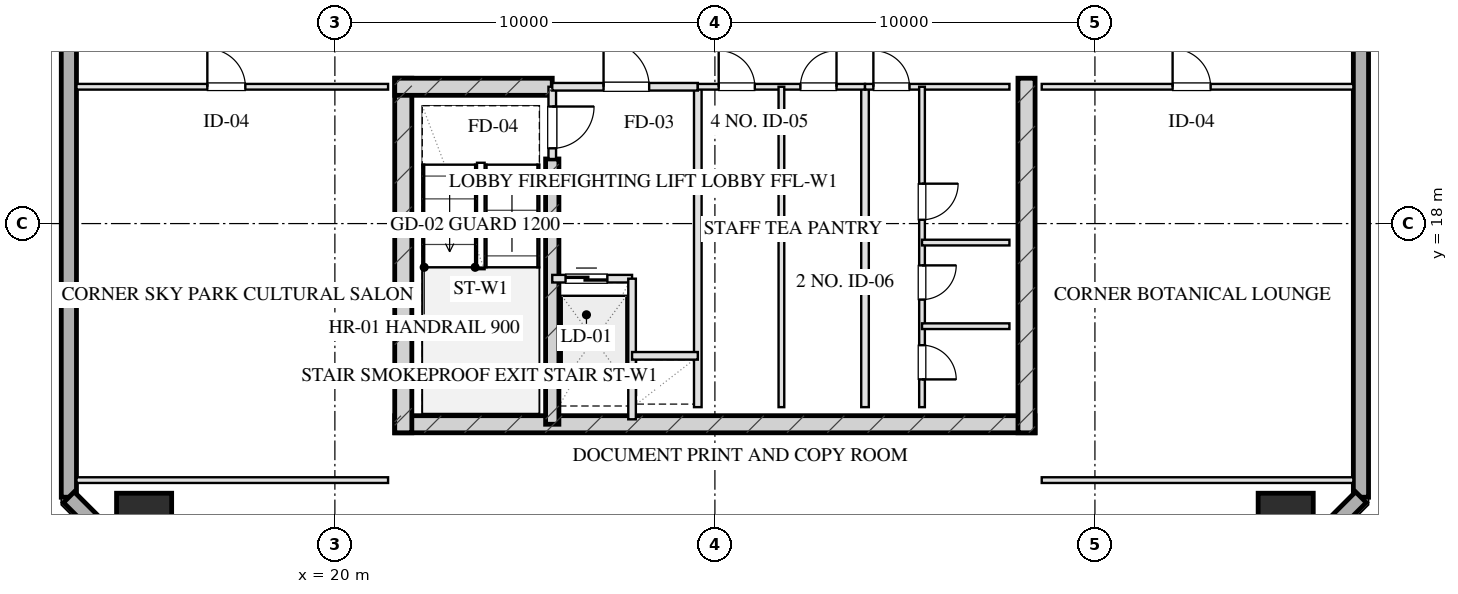
"""IFC4 building model, lengths in metres.
Left out: names, types, materials, properties, quantities, classifications, styles, units other than length and angle.
Written with IfcOpenShell. Run it as: python <this file> out.ifc"""

import sys

from ifc_helpers import new_model, si_unit, direction, frame, frame_2d, origin, origin_2d, place, context, subcontext, project, spatial, rectangle, hollow_rectangle, extrude, element, fill, save


model = new_model("IFC4")
c1 = context("Model", 3, precision=1e-05, world=origin(), true_north=direction((0.0, 1.0)))
c2 = subcontext(c1, "Body", "Model", "MODEL_VIEW")
j1 = project(units=[si_unit("LENGTHUNIT", "METRE"), si_unit("PLANEANGLEUNIT", "RADIAN")], contexts=[c1])
p1 = place(None, origin())
s1 = spatial("IfcSite", under=j1, at=p1, CompositionType="ELEMENT")
p2 = place(p1, origin())
s2 = spatial("IfcBuilding", under=s1, at=p2, CompositionType="ELEMENT")
p3 = place(p2, frame((0.0, 0.0, 219.65)))
s3 = spatial("IfcBuildingStorey", under=s2, at=p3, CompositionType="ELEMENT", Elevation=219.65)
p4 = place(p3, frame((21.575, 12.72, 0.0), z_axis=(0.0, 0.0, 1.0), x_axis=(1.0, 0.0, 0.0)))
e1 = element("IfcWall", 1, at=p4, inside=s3, PredefinedType="SHEAR", context=c2, shape_type="SweptSolid", body=[
    extrude(rectangle(XDim=16.85, YDim=0.45, at=frame_2d((8.425, 0.0))), origin(), (0.0, 0.0, 1.0), 3.45),
])
for number, where, z_axis, x_axis in (
    (2, (21.8, 21.825, 0.0), (0.0, 0.0, 1.0), (0.0, -1.0, 0.0)),
    (3, (38.2, 21.825, 0.0), (0.0, 0.0, 1.0), (0.0, -1.0, 0.0)),
):
    element("IfcWall", number, at=place(p3, frame(where, z_axis=z_axis, x_axis=x_axis)), inside=s3, PredefinedType="SHEAR", context=c2, shape_type="SweptSolid", body=[
        extrude(rectangle(XDim=9.33, YDim=0.45, at=frame_2d((4.665, 0.0))), origin(), (0.0, 0.0, 1.0), 3.45),
    ])
p5 = place(p3, frame((25.72, 19.7, 0.0), z_axis=(0.0, 0.0, 1.0), x_axis=(0.0, -1.0, 0.0)))
e4 = element("IfcWall", 4, at=p5, inside=s3, PredefinedType="SHEAR", context=c2, shape_type="SweptSolid", body=[
    extrude(rectangle(XDim=6.98, YDim=0.35, at=frame_2d((3.49, 0.0))), origin(), (0.0, 0.0, 1.0), 3.45),
])
p6 = place(p3, frame((21.575, 21.6, 0.0), z_axis=(0.0, 0.0, 1.0), x_axis=(1.0, 0.0, 0.0)))
e5 = element("IfcWall", 5, at=p6, inside=s3, PredefinedType="SHEAR", context=c2, shape_type="SweptSolid", body=[
    extrude(rectangle(XDim=4.145, YDim=0.45, at=frame_2d((2.073, 0.0))), origin(), (0.0, 0.0, 1.0), 3.45),
])
for number, where, z_axis, x_axis in (
    (6, (14.98, 10.18, 0.0), (0.0, 0.0, 1.0), (1.0, 0.0, 0.0)),
    (7, (45.02, 10.18, 0.0), (0.0, 0.0, 1.0), (1.0, 0.0, 0.0)),
):
    element("IfcColumn", number, at=place(p3, frame(where, z_axis=z_axis, x_axis=x_axis)), inside=s3, PredefinedType="COLUMN", context=c2, shape_type="SweptSolid", body=[
        extrude(hollow_rectangle(XDim=1.45, YDim=1.45, WallThickness=0.05, at=origin_2d()), origin(), (0.0, 0.0, 1.0), 3.451),
    ])
p7 = place(p3, frame((13.0, 10.8, 0.0), z_axis=(0.0, 0.0, 1.0), x_axis=(0.0, 1.0, 0.0)))
e8 = element("IfcWall", 8, at=p7, inside=s3, PredefinedType="SOLIDWALL", context=c2, shape_type="SweptSolid", body=[
    extrude(rectangle(XDim=46.4, YDim=0.4, at=frame_2d((23.2, 0.0))), origin(), (0.0, 0.0, 1.0), 2.61),
])
p8 = place(p7, frame((15.75, 0.0, 0.75)))
e9 = element("IfcOpeningElement", 9, at=p8, cuts=e8, PredefinedType="OPENING", context=c2, shape_type="SweptSolid", body=[
    extrude(rectangle(XDim=2.1, YDim=1.46, at=frame_2d((1.05, 0.73))), frame((0.0, 0.21, 0.0), z_axis=(0.0, -1.0, 0.0), x_axis=(1.0, 0.0, 0.0)), (0.0, 0.0, 1.0), 0.42),
])
p9 = place(p7, frame((19.55, 0.0, 0.75)))
e10 = element("IfcOpeningElement", 10, at=p9, cuts=e8, PredefinedType="OPENING", context=c2, shape_type="SweptSolid", body=[
    extrude(rectangle(XDim=2.1, YDim=1.46, at=frame_2d((1.05, 0.73))), frame((0.0, 0.21, 0.0), z_axis=(0.0, -1.0, 0.0), x_axis=(1.0, 0.0, 0.0)), (0.0, 0.0, 1.0), 0.42),
])
p10 = place(p7, frame((24.75, 0.0, 0.75)))
e11 = element("IfcOpeningElement", 11, at=p10, cuts=e8, PredefinedType="OPENING", context=c2, shape_type="SweptSolid", body=[
    extrude(rectangle(XDim=2.1, YDim=1.46, at=frame_2d((1.05, 0.73))), frame((0.0, 0.21, 0.0), z_axis=(0.0, -1.0, 0.0), x_axis=(1.0, 0.0, 0.0)), (0.0, 0.0, 1.0), 0.42),
])
p11 = place(p7, frame((28.55, 0.0, 0.75)))
e12 = element("IfcOpeningElement", 12, at=p11, cuts=e8, PredefinedType="OPENING", context=c2, shape_type="SweptSolid", body=[
    extrude(rectangle(XDim=2.1, YDim=1.46, at=frame_2d((1.05, 0.73))), frame((0.0, 0.21, 0.0), z_axis=(0.0, -1.0, 0.0), x_axis=(1.0, 0.0, 0.0)), (0.0, 0.0, 1.0), 0.42),
])
p12 = place(p3, frame((47.0, 57.2, 0.0), z_axis=(0.0, 0.0, 1.0), x_axis=(0.0, -1.0, 0.0)))
e13 = element("IfcWall", 13, at=p12, inside=s3, PredefinedType="SOLIDWALL", context=c2, shape_type="SweptSolid", body=[
    extrude(rectangle(XDim=46.4, YDim=0.4, at=frame_2d((23.2, 0.0))), origin(), (0.0, 0.0, 1.0), 2.61),
])
p13 = place(p12, frame((20.85, 0.0, 0.0)))
e14 = element("IfcOpeningElement", 14, at=p13, cuts=e13, PredefinedType="OPENING", context=c2, shape_type="SweptSolid", body=[
    extrude(rectangle(XDim=1.8, YDim=2.2, at=frame_2d((0.9, 1.1))), frame((0.0, 0.21, 0.0), z_axis=(0.0, -1.0, 0.0), x_axis=(1.0, 0.0, 0.0)), (0.0, 0.0, 1.0), 0.42),
])
for number, where, z_axis, x_axis in (
    (15, (47.0, 10.8, 0.0), (0.0, 0.0, 1.0), (-0.707, -0.707, 0.0)),
    (16, (15.6, 8.2, 0.0), (0.0, 0.0, 1.0), (-0.707, 0.707, 0.0)),
):
    element("IfcWall", number, at=place(p3, frame(where, z_axis=z_axis, x_axis=x_axis)), inside=s3, PredefinedType="SOLIDWALL", context=c2, shape_type="SweptSolid", body=[
        extrude(rectangle(XDim=3.677, YDim=0.4, at=frame_2d((1.838, 0.0))), origin(), (0.0, 0.0, 1.0), 2.61),
    ])
p14 = place(p3, frame((25.72, 21.6, 0.0), z_axis=(0.0, 0.0, 1.0), x_axis=(0.0, -1.0, 0.0)))
e17 = element("IfcWall", 17, at=p14, inside=s3, PredefinedType="PARTITIONING", context=c2, shape_type="SweptSolid", body=[
    extrude(rectangle(XDim=1.9, YDim=0.2, at=frame_2d((0.95, 0.0))), origin(), (0.0, 0.0, 1.0), 3.175),
])
p15 = place(p14, frame((0.52, 0.0, 0.0)))
e18 = element("IfcOpeningElement", 18, at=p15, cuts=e17, PredefinedType="OPENING", context=c2, shape_type="SweptSolid", body=[
    extrude(rectangle(XDim=1.1, YDim=2.05, at=frame_2d((0.55, 1.025))), frame((0.0, 0.11, 0.0), z_axis=(0.0, -1.0, 0.0), x_axis=(1.0, 0.0, 0.0)), (0.0, 0.0, 1.0), 0.22),
])
p16 = place(p3, frame((29.55, 21.6, 0.0), z_axis=(0.0, 0.0, 1.0), x_axis=(0.0, -1.0, 0.0)))
e19 = element("IfcWall", 19, at=p16, inside=s3, PredefinedType="PARTITIONING", context=c2, shape_type="SweptSolid", body=[
    extrude(rectangle(XDim=8.43, YDim=0.2, at=frame_2d((4.215, 0.0))), origin(), (0.0, 0.0, 1.0), 3.175),
])
p17 = place(p3, frame((25.72, 21.6, 0.0), z_axis=(0.0, 0.0, 1.0), x_axis=(1.0, 0.0, 0.0)))
e20 = element("IfcWall", 20, at=p17, inside=s3, PredefinedType="PARTITIONING", context=c2, shape_type="SweptSolid", body=[
    extrude(rectangle(XDim=3.83, YDim=0.2, at=frame_2d((1.915, 0.0))), origin(), (0.0, 0.0, 1.0), 3.175),
])
p18 = place(p17, frame((1.35, 0.0, 0.0)))
e21 = element("IfcOpeningElement", 21, at=p18, cuts=e20, PredefinedType="OPENING", context=c2, shape_type="SweptSolid", body=[
    extrude(rectangle(XDim=1.2, YDim=2.05, at=frame_2d((0.6, 1.025))), frame((0.0, 0.11, 0.0), z_axis=(0.0, -1.0, 0.0), x_axis=(1.0, 0.0, 0.0)), (0.0, 0.0, 1.0), 0.22),
])
p19 = place(p3, frame((25.72, 16.55, 0.0), z_axis=(0.0, 0.0, 1.0), x_axis=(1.0, 0.0, 0.0)))
e22 = element("IfcWall", 22, at=p19, inside=s3, PredefinedType="PARTITIONING", context=c2, shape_type="SweptSolid", body=[
    extrude(rectangle(XDim=2.1, YDim=0.2, at=frame_2d((1.05, 0.0))), origin(), (0.0, 0.0, 1.0), 3.175),
])
p20 = place(p19, frame((0.35, 0.0, 0.0)))
e23 = element("IfcOpeningElement", 23, at=p20, cuts=e22, PredefinedType="OPENING", context=c2, shape_type="SweptSolid", body=[
    extrude(rectangle(XDim=1.1, YDim=2.05, at=frame_2d((0.55, 1.025))), frame((0.0, 0.11, 0.0), z_axis=(0.0, -1.0, 0.0), x_axis=(1.0, 0.0, 0.0)), (0.0, 0.0, 1.0), 0.22),
])
p21 = place(p3, frame((27.82, 16.55, 0.0), z_axis=(0.0, 0.0, 1.0), x_axis=(0.0, -1.0, 0.0)))
e24 = element("IfcWall", 24, at=p21, inside=s3, PredefinedType="PARTITIONING", context=c2, shape_type="SweptSolid", body=[
    extrude(rectangle(XDim=3.7, YDim=0.2, at=frame_2d((1.85, 0.0))), origin(), (0.0, 0.0, 1.0), 3.175),
])
p22 = place(p3, frame((27.82, 14.52, 0.0), z_axis=(0.0, 0.0, 1.0), x_axis=(1.0, 0.0, 0.0)))
e25 = element("IfcWall", 25, at=p22, inside=s3, PredefinedType="PARTITIONING", context=c2, shape_type="SweptSolid", body=[
    extrude(rectangle(XDim=1.73, YDim=0.2, at=frame_2d((0.865, 0.0))), origin(), (0.0, 0.0, 1.0), 3.175),
])
p23 = place(p3, frame((33.95, 21.6, 0.0), z_axis=(0.0, 0.0, 1.0), x_axis=(0.0, -1.0, 0.0)))
e26 = element("IfcWall", 26, at=p23, inside=s3, PredefinedType="PARTITIONING", context=c2, shape_type="SweptSolid", body=[
    extrude(rectangle(XDim=8.43, YDim=0.2, at=frame_2d((4.215, 0.0))), origin(), (0.0, 0.0, 1.0), 3.175),
])
p24 = place(p3, frame((29.55, 21.6, 0.0), z_axis=(0.0, 0.0, 1.0), x_axis=(1.0, 0.0, 0.0)))
e27 = element("IfcWall", 27, at=p24, inside=s3, PredefinedType="PARTITIONING", context=c2, shape_type="SweptSolid", body=[
    extrude(rectangle(XDim=4.4, YDim=0.15, at=frame_2d((2.2, 0.0))), origin(), (0.0, 0.0, 1.0), 3.175),
])
p25 = place(p24, frame((0.55, 0.0, 0.0)))
e28 = element("IfcOpeningElement", 28, at=p25, cuts=e27, PredefinedType="OPENING", context=c2, shape_type="SweptSolid", body=[
    extrude(rectangle(XDim=0.95, YDim=2.05, at=frame_2d((0.475, 1.025))), frame((0.0, 0.085, 0.0), z_axis=(0.0, -1.0, 0.0), x_axis=(1.0, 0.0, 0.0)), (0.0, 0.0, 1.0), 0.17),
])
p26 = place(p24, frame((2.7, 0.0, 0.0)))
e29 = element("IfcOpeningElement", 29, at=p26, cuts=e27, PredefinedType="OPENING", context=c2, shape_type="SweptSolid", body=[
    extrude(rectangle(XDim=0.95, YDim=2.05, at=frame_2d((0.475, 1.025))), frame((0.0, 0.085, 0.0), z_axis=(0.0, -1.0, 0.0), x_axis=(1.0, 0.0, 0.0)), (0.0, 0.0, 1.0), 0.17),
])
p27 = place(p3, frame((31.75, 21.6, 0.0), z_axis=(0.0, 0.0, 1.0), x_axis=(0.0, -1.0, 0.0)))
e30 = element("IfcWall", 30, at=p27, inside=s3, PredefinedType="PARTITIONING", context=c2, shape_type="SweptSolid", body=[
    extrude(rectangle(XDim=8.43, YDim=0.15, at=frame_2d((4.215, 0.0))), origin(), (0.0, 0.0, 1.0), 3.175),
])
p28 = place(p3, frame((33.95, 21.6, 0.0), z_axis=(0.0, 0.0, 1.0), x_axis=(1.0, 0.0, 0.0)))
e31 = element("IfcWall", 31, at=p28, inside=s3, PredefinedType="PARTITIONING", context=c2, shape_type="SweptSolid", body=[
    extrude(rectangle(XDim=3.8, YDim=0.15, at=frame_2d((1.9, 0.0))), origin(), (0.0, 0.0, 1.0), 3.175),
])
p29 = place(p28, frame((0.22, 0.0, 0.0)))
e32 = element("IfcOpeningElement", 32, at=p29, cuts=e31, PredefinedType="OPENING", context=c2, shape_type="SweptSolid", body=[
    extrude(rectangle(XDim=0.95, YDim=2.05, at=frame_2d((0.475, 1.025))), frame((0.0, 0.085, 0.0), z_axis=(0.0, -1.0, 0.0), x_axis=(1.0, 0.0, 0.0)), (0.0, 0.0, 1.0), 0.17),
])
p30 = place(p3, frame((35.45, 21.6, 0.0), z_axis=(0.0, 0.0, 1.0), x_axis=(0.0, -1.0, 0.0)))
e33 = element("IfcWall", 33, at=p30, inside=s3, PredefinedType="PARTITIONING", context=c2, shape_type="SweptSolid", body=[
    extrude(rectangle(XDim=8.43, YDim=0.15, at=frame_2d((4.215, 0.0))), origin(), (0.0, 0.0, 1.0), 2.815),
])
p31 = place(p30, frame((2.55, 0.0, 0.0)))
e34 = element("IfcOpeningElement", 34, at=p31, cuts=e33, PredefinedType="OPENING", context=c2, shape_type="SweptSolid", body=[
    extrude(rectangle(XDim=0.95, YDim=2.05, at=frame_2d((0.475, 1.025))), frame((0.0, 0.085, 0.0), z_axis=(0.0, -1.0, 0.0), x_axis=(1.0, 0.0, 0.0)), (0.0, 0.0, 1.0), 0.17),
])
p32 = place(p30, frame((4.7, 0.0, 0.0)))
e35 = element("IfcOpeningElement", 35, at=p32, cuts=e33, PredefinedType="OPENING", context=c2, shape_type="SweptSolid", body=[
    extrude(rectangle(XDim=0.9, YDim=2.05, at=frame_2d((0.45, 1.025))), frame((0.0, 0.085, 0.0), z_axis=(0.0, -1.0, 0.0), x_axis=(1.0, 0.0, 0.0)), (0.0, 0.0, 1.0), 0.17),
])
p33 = place(p30, frame((6.8, 0.0, 0.0)))
e36 = element("IfcOpeningElement", 36, at=p33, cuts=e33, PredefinedType="OPENING", context=c2, shape_type="SweptSolid", body=[
    extrude(rectangle(XDim=0.9, YDim=2.05, at=frame_2d((0.45, 1.025))), frame((0.0, 0.085, 0.0), z_axis=(0.0, -1.0, 0.0), x_axis=(1.0, 0.0, 0.0)), (0.0, 0.0, 1.0), 0.17),
])
for number, where, z_axis, x_axis in (
    (37, (35.45, 17.5, 0.0), (0.0, 0.0, 1.0), (1.0, 0.0, 0.0)),
    (38, (35.45, 15.3, 0.0), (0.0, 0.0, 1.0), (1.0, 0.0, 0.0)),
):
    element("IfcWall", number, at=place(p3, frame(where, z_axis=z_axis, x_axis=x_axis)), inside=s3, PredefinedType="PARTITIONING", context=c2, shape_type="SweptSolid", body=[
        extrude(rectangle(XDim=2.3, YDim=0.15, at=frame_2d((1.15, 0.0))), origin(), (0.0, 0.0, 1.0), 3.175),
    ])
p34 = place(p3, frame((13.2, 11.25, 0.0), z_axis=(0.0, 0.0, 1.0), x_axis=(1.0, 0.0, 0.0)))
e39 = element("IfcWall", 39, at=p34, inside=s3, PredefinedType="PARTITIONING", context=c2, shape_type="SweptSolid", body=[
    extrude(rectangle(XDim=8.2, YDim=0.15, at=frame_2d((4.1, 0.0))), origin(), (0.0, 0.0, 1.0), 3.175),
])
p35 = place(p3, frame((13.2, 21.6, 0.0), z_axis=(0.0, 0.0, 1.0), x_axis=(1.0, 0.0, 0.0)))
e40 = element("IfcWall", 40, at=p35, inside=s3, PredefinedType="PARTITIONING", context=c2, shape_type="SweptSolid", body=[
    extrude(rectangle(XDim=8.2, YDim=0.15, at=frame_2d((4.1, 0.0))), origin(), (0.0, 0.0, 1.0), 3.175),
])
p36 = place(p35, frame((3.444, 0.0, 0.0)))
e41 = element("IfcOpeningElement", 41, at=p36, cuts=e40, PredefinedType="OPENING", context=c2, shape_type="SweptSolid", body=[
    extrude(rectangle(XDim=1.0, YDim=2.05, at=frame_2d((0.5, 1.025))), frame((0.0, 0.085, 0.0), z_axis=(0.0, -1.0, 0.0), x_axis=(1.0, 0.0, 0.0)), (0.0, 0.0, 1.0), 0.17),
])
p37 = place(p3, frame((38.6, 11.25, 0.0), z_axis=(0.0, 0.0, 1.0), x_axis=(1.0, 0.0, 0.0)))
e42 = element("IfcWall", 42, at=p37, inside=s3, PredefinedType="PARTITIONING", context=c2, shape_type="SweptSolid", body=[
    extrude(rectangle(XDim=8.2, YDim=0.15, at=frame_2d((4.1, 0.0))), origin(), (0.0, 0.0, 1.0), 3.175),
])
p38 = place(p3, frame((38.6, 21.6, 0.0), z_axis=(0.0, 0.0, 1.0), x_axis=(1.0, 0.0, 0.0)))
e43 = element("IfcWall", 43, at=p38, inside=s3, PredefinedType="PARTITIONING", context=c2, shape_type="SweptSolid", body=[
    extrude(rectangle(XDim=8.2, YDim=0.15, at=frame_2d((4.1, 0.0))), origin(), (0.0, 0.0, 1.0), 3.175),
])
p39 = place(p38, frame((3.444, 0.0, 0.0)))
e44 = element("IfcOpeningElement", 44, at=p39, cuts=e43, PredefinedType="OPENING", context=c2, shape_type="SweptSolid", body=[
    extrude(rectangle(XDim=1.0, YDim=2.05, at=frame_2d((0.5, 1.025))), frame((0.0, 0.085, 0.0), z_axis=(0.0, -1.0, 0.0), x_axis=(1.0, 0.0, 0.0)), (0.0, 0.0, 1.0), 0.17),
])
p40 = place(p15, origin())
e45 = element("IfcDoor", 45, at=p40, inside=s3, OperationType="SINGLE_SWING_LEFT", PredefinedType="DOOR", context=c2, shape_type="SweptSolid", body=[
    extrude(rectangle(XDim=1.1, YDim=2.05, at=frame_2d((0.55, 1.025))), frame((0.0, 0.025, 0.0), z_axis=(0.0, -1.0, 0.0), x_axis=(1.0, 0.0, 0.0)), (0.0, 0.0, 1.0), 0.05),
])
fill(e18, e45)
p41 = place(p18, origin())
e46 = element("IfcDoor", 46, at=p41, inside=s3, OperationType="SINGLE_SWING_LEFT", PredefinedType="DOOR", context=c2, shape_type="SweptSolid", body=[
    extrude(rectangle(XDim=1.2, YDim=2.05, at=frame_2d((0.6, 1.025))), frame((0.0, 0.025, 0.0), z_axis=(0.0, -1.0, 0.0), x_axis=(1.0, 0.0, 0.0)), (0.0, 0.0, 1.0), 0.05),
])
fill(e21, e46)
p42 = place(p20, origin())
e47 = element("IfcDoor", 47, at=p42, inside=s3, OperationType="DOUBLE_DOOR_SLIDING", PredefinedType="DOOR", context=c2, shape_type="SweptSolid", body=[
    extrude(rectangle(XDim=1.1, YDim=2.05, at=frame_2d((0.55, 1.025))), frame((0.0, 0.025, 0.0), z_axis=(0.0, -1.0, 0.0), x_axis=(1.0, 0.0, 0.0)), (0.0, 0.0, 1.0), 0.05),
])
fill(e23, e47)
p43 = place(p25, origin())
e48 = element("IfcDoor", 48, at=p43, inside=s3, OperationType="SINGLE_SWING_LEFT", PredefinedType="DOOR", context=c2, shape_type="SweptSolid", body=[
    extrude(rectangle(XDim=0.95, YDim=2.05, at=frame_2d((0.475, 1.025))), frame((0.0, 0.025, 0.0), z_axis=(0.0, -1.0, 0.0), x_axis=(1.0, 0.0, 0.0)), (0.0, 0.0, 1.0), 0.05),
])
fill(e28, e48)
p44 = place(p26, origin())
e49 = element("IfcDoor", 49, at=p44, inside=s3, OperationType="SINGLE_SWING_RIGHT", PredefinedType="DOOR", context=c2, shape_type="SweptSolid", body=[
    extrude(rectangle(XDim=0.95, YDim=2.05, at=frame_2d((0.475, 1.025))), frame((0.0, 0.025, 0.0), z_axis=(0.0, -1.0, 0.0), x_axis=(1.0, 0.0, 0.0)), (0.0, 0.0, 1.0), 0.05),
])
fill(e29, e49)
p45 = place(p29, origin())
e50 = element("IfcDoor", 50, at=p45, inside=s3, OperationType="SINGLE_SWING_LEFT", PredefinedType="DOOR", context=c2, shape_type="SweptSolid", body=[
    extrude(rectangle(XDim=0.95, YDim=2.05, at=frame_2d((0.475, 1.025))), frame((0.0, 0.025, 0.0), z_axis=(0.0, -1.0, 0.0), x_axis=(1.0, 0.0, 0.0)), (0.0, 0.0, 1.0), 0.05),
])
fill(e32, e50)
p46 = place(p31, origin())
e51 = element("IfcDoor", 51, at=p46, inside=s3, OperationType="SINGLE_SWING_LEFT", PredefinedType="DOOR", context=c2, shape_type="SweptSolid", body=[
    extrude(rectangle(XDim=0.95, YDim=2.05, at=frame_2d((0.475, 1.025))), frame((0.0, 0.025, 0.0), z_axis=(0.0, -1.0, 0.0), x_axis=(1.0, 0.0, 0.0)), (0.0, 0.0, 1.0), 0.05),
])
fill(e34, e51)
p47 = place(p32, origin())
e52 = element("IfcDoor", 52, at=p47, inside=s3, OperationType="SINGLE_SWING_LEFT", PredefinedType="DOOR", context=c2, shape_type="SweptSolid", body=[
    extrude(rectangle(XDim=0.9, YDim=2.05, at=frame_2d((0.45, 1.025))), frame((0.0, 0.025, 0.0), z_axis=(0.0, -1.0, 0.0), x_axis=(1.0, 0.0, 0.0)), (0.0, 0.0, 1.0), 0.05),
])
fill(e35, e52)
p48 = place(p33, origin())
e53 = element("IfcDoor", 53, at=p48, inside=s3, OperationType="SINGLE_SWING_RIGHT", PredefinedType="DOOR", context=c2, shape_type="SweptSolid", body=[
    extrude(rectangle(XDim=0.9, YDim=2.05, at=frame_2d((0.45, 1.025))), frame((0.0, 0.025, 0.0), z_axis=(0.0, -1.0, 0.0), x_axis=(1.0, 0.0, 0.0)), (0.0, 0.0, 1.0), 0.05),
])
fill(e36, e53)
p49 = place(p36, origin())
e54 = element("IfcDoor", 54, at=p49, inside=s3, OperationType="SINGLE_SWING_LEFT", PredefinedType="DOOR", context=c2, shape_type="SweptSolid", body=[
    extrude(rectangle(XDim=1.0, YDim=2.05, at=frame_2d((0.5, 1.025))), frame((0.0, 0.025, 0.0), z_axis=(0.0, -1.0, 0.0), x_axis=(1.0, 0.0, 0.0)), (0.0, 0.0, 1.0), 0.05),
])
fill(e41, e54)
p50 = place(p39, origin())
e55 = element("IfcDoor", 55, at=p50, inside=s3, OperationType="SINGLE_SWING_LEFT", PredefinedType="DOOR", context=c2, shape_type="SweptSolid", body=[
    extrude(rectangle(XDim=1.0, YDim=2.05, at=frame_2d((0.5, 1.025))), frame((0.0, 0.025, 0.0), z_axis=(0.0, -1.0, 0.0), x_axis=(1.0, 0.0, 0.0)), (0.0, 0.0, 1.0), 0.05),
])
fill(e44, e55)
save(model, sys.argv[1])
